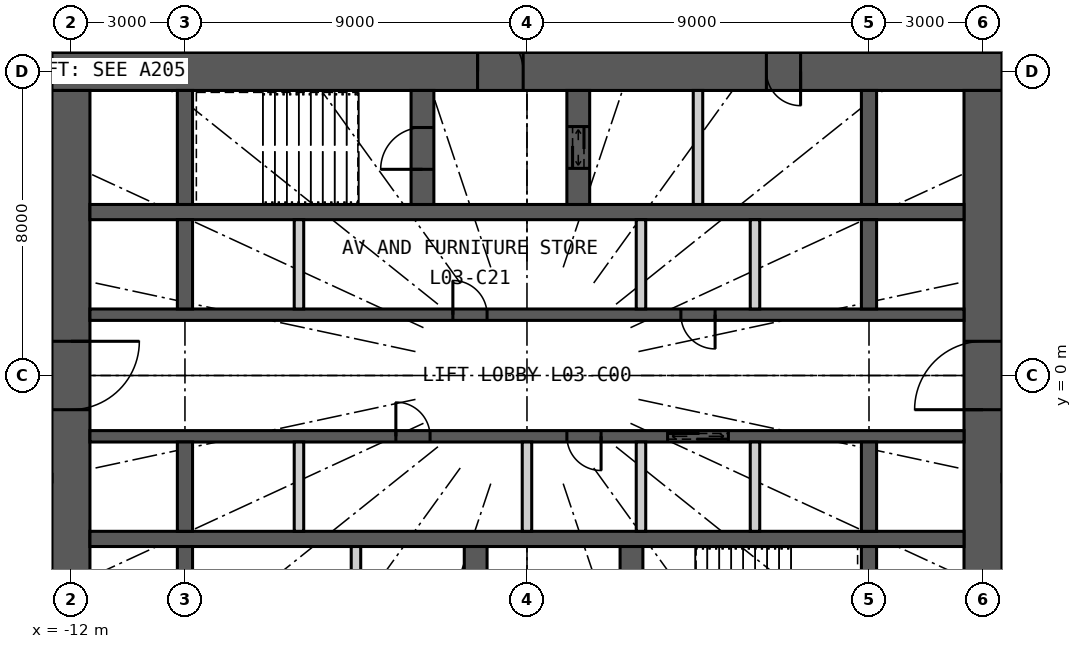
"""IFC4 building model, lengths in metres.
Left out: names, types, materials, properties, quantities, classifications, styles, units other than length and angle.
Written with IfcOpenShell. Run it as: python <this file> out.ifc"""

import sys

from ifc_helpers import new_model, si_unit, direction, frame, frame_2d, origin, place, context, subcontext, project, spatial, rectangle, extrude, element, fill, save


model = new_model("IFC4")
c1 = context("Model", 3, precision=1e-05, world=origin(), true_north=direction((0.0, 1.0)))
c2 = subcontext(c1, "Body", "Model", "MODEL_VIEW")
j1 = project(units=[si_unit("LENGTHUNIT", "METRE"), si_unit("PLANEANGLEUNIT", "RADIAN")], contexts=[c1])
p1 = place(None, origin())
s1 = spatial("IfcSite", under=j1, at=p1, CompositionType="ELEMENT")
p2 = place(p1, origin())
s2 = spatial("IfcBuilding", under=s1, at=p2, CompositionType="ELEMENT")
p3 = place(p2, frame((0.0, 0.0, 19.2)))
s3 = spatial("IfcBuildingStorey", under=s2, at=p3, CompositionType="ELEMENT", Elevation=19.2)
p4 = place(p3, frame((-12.5, 8.0, 0.0), z_axis=(0.0, 0.0, 1.0), x_axis=(1.0, 0.0, 0.0)))
e1 = element("IfcWall", 1, at=p4, inside=s3, PredefinedType="SHEAR", context=c2, shape_type="SweptSolid", body=[
    extrude(rectangle(XDim=25.0, YDim=1.0, at=frame_2d((12.5, 0.0))), origin(), (0.0, 0.0, 1.0), 5.4),
])
p5 = place(p4, frame((11.2, 0.0, 0.0)))
e2 = element("IfcOpeningElement", 2, at=p5, cuts=e1, PredefinedType="OPENING", context=c2, shape_type="SweptSolid", body=[
    extrude(rectangle(XDim=1.2, YDim=2.2, at=frame_2d((0.6, 1.1))), frame((0.0, 0.51, 0.0), z_axis=(0.0, -1.0, 0.0), x_axis=(1.0, 0.0, 0.0)), (0.0, 0.0, 1.0), 1.02),
])
p6 = place(p4, frame((18.8, 0.0, 0.0)))
e3 = element("IfcOpeningElement", 3, at=p6, cuts=e1, PredefinedType="OPENING", context=c2, shape_type="SweptSolid", body=[
    extrude(rectangle(XDim=0.9, YDim=2.2, at=frame_2d((0.45, 1.1))), frame((0.0, 0.51, 0.0), z_axis=(0.0, -1.0, 0.0), x_axis=(1.0, 0.0, 0.0)), (0.0, 0.0, 1.0), 1.02),
])
p7 = place(p3, frame((12.0, -7.5, 0.0), z_axis=(0.0, 0.0, 1.0), x_axis=(0.0, 1.0, 0.0)))
e4 = element("IfcWall", 4, at=p7, inside=s3, PredefinedType="SHEAR", context=c2, shape_type="SweptSolid", body=[
    extrude(rectangle(XDim=15.0, YDim=1.0, at=frame_2d((7.5, 0.0))), origin(), (0.0, 0.0, 1.0), 5.4),
])
p8 = place(p7, frame((6.6, 0.0, 0.0)))
e5 = element("IfcOpeningElement", 5, at=p8, cuts=e4, PredefinedType="OPENING", context=c2, shape_type="SweptSolid", body=[
    extrude(rectangle(XDim=1.8, YDim=2.2, at=frame_2d((0.9, 1.1))), frame((0.0, 0.51, 0.0), z_axis=(0.0, -1.0, 0.0), x_axis=(1.0, 0.0, 0.0)), (0.0, 0.0, 1.0), 1.02),
])
p9 = place(p3, frame((-12.0, 7.5, 0.0), z_axis=(0.0, 0.0, 1.0), x_axis=(0.0, -1.0, 0.0)))
e6 = element("IfcWall", 6, at=p9, inside=s3, PredefinedType="SHEAR", context=c2, shape_type="SweptSolid", body=[
    extrude(rectangle(XDim=15.0, YDim=1.0, at=frame_2d((7.5, 0.0))), origin(), (0.0, 0.0, 1.0), 5.4),
])
p10 = place(p9, frame((6.6, 0.0, 0.0)))
e7 = element("IfcOpeningElement", 7, at=p10, cuts=e6, PredefinedType="OPENING", context=c2, shape_type="SweptSolid", body=[
    extrude(rectangle(XDim=1.8, YDim=2.2, at=frame_2d((0.9, 1.1))), frame((0.0, 0.51, 0.0), z_axis=(0.0, -1.0, 0.0), x_axis=(1.0, 0.0, 0.0)), (0.0, 0.0, 1.0), 1.02),
])
p11 = place(p3, frame((-11.5, 4.3, 0.0), z_axis=(0.0, 0.0, 1.0), x_axis=(1.0, 0.0, 0.0)))
e8 = element("IfcWall", 8, at=p11, inside=s3, PredefinedType="SHEAR", context=c2, shape_type="SweptSolid", body=[
    extrude(rectangle(XDim=23.0, YDim=0.4, at=frame_2d((11.5, 0.0))), origin(), (0.0, 0.0, 1.0), 5.4),
])
p12 = place(p3, frame((-11.5, 1.6, 0.0), z_axis=(0.0, 0.0, 1.0), x_axis=(1.0, 0.0, 0.0)))
e9 = element("IfcWall", 9, at=p12, inside=s3, PredefinedType="SHEAR", context=c2, shape_type="SweptSolid", body=[
    extrude(rectangle(XDim=23.0, YDim=0.3, at=frame_2d((11.5, 0.0))), origin(), (0.0, 0.0, 1.0), 5.4),
])
p13 = place(p12, frame((9.55, 0.0, 0.0)))
e10 = element("IfcOpeningElement", 10, at=p13, cuts=e9, PredefinedType="OPENING", context=c2, shape_type="SweptSolid", body=[
    extrude(rectangle(XDim=0.9, YDim=2.2, at=frame_2d((0.45, 1.1))), frame((0.0, 0.16, 0.0), z_axis=(0.0, -1.0, 0.0), x_axis=(1.0, 0.0, 0.0)), (0.0, 0.0, 1.0), 0.32),
])
p14 = place(p12, frame((15.55, 0.0, 0.0)))
e11 = element("IfcOpeningElement", 11, at=p14, cuts=e9, PredefinedType="OPENING", context=c2, shape_type="SweptSolid", body=[
    extrude(rectangle(XDim=0.9, YDim=2.2, at=frame_2d((0.45, 1.1))), frame((0.0, 0.16, 0.0), z_axis=(0.0, -1.0, 0.0), x_axis=(1.0, 0.0, 0.0)), (0.0, 0.0, 1.0), 0.32),
])
p15 = place(p3, frame((-11.5, -4.3, 0.0), z_axis=(0.0, 0.0, 1.0), x_axis=(1.0, 0.0, 0.0)))
e12 = element("IfcWall", 12, at=p15, inside=s3, PredefinedType="SHEAR", context=c2, shape_type="SweptSolid", body=[
    extrude(rectangle(XDim=23.0, YDim=0.4, at=frame_2d((11.5, 0.0))), origin(), (0.0, 0.0, 1.0), 5.4),
])
p16 = place(p3, frame((-11.5, -1.6, 0.0), z_axis=(0.0, 0.0, 1.0), x_axis=(1.0, 0.0, 0.0)))
e13 = element("IfcWall", 13, at=p16, inside=s3, PredefinedType="SHEAR", context=c2, shape_type="SweptSolid", body=[
    extrude(rectangle(XDim=23.0, YDim=0.3, at=frame_2d((11.5, 0.0))), origin(), (0.0, 0.0, 1.0), 5.4),
])
p17 = place(p16, frame((15.2, 0.0, 0.0)))
e14 = element("IfcOpeningElement", 14, at=p17, cuts=e13, PredefinedType="OPENING", context=c2, shape_type="SweptSolid", body=[
    extrude(rectangle(XDim=1.6, YDim=2.4, at=frame_2d((0.8, 1.2))), frame((0.0, 0.16, 0.0), z_axis=(0.0, -1.0, 0.0), x_axis=(1.0, 0.0, 0.0)), (0.0, 0.0, 1.0), 0.32),
])
p18 = place(p16, frame((8.05, 0.0, 0.0)))
e15 = element("IfcOpeningElement", 15, at=p18, cuts=e13, PredefinedType="OPENING", context=c2, shape_type="SweptSolid", body=[
    extrude(rectangle(XDim=0.9, YDim=2.2, at=frame_2d((0.45, 1.1))), frame((0.0, 0.16, 0.0), z_axis=(0.0, -1.0, 0.0), x_axis=(1.0, 0.0, 0.0)), (0.0, 0.0, 1.0), 0.32),
])
p19 = place(p16, frame((12.55, 0.0, 0.0)))
e16 = element("IfcOpeningElement", 16, at=p19, cuts=e13, PredefinedType="OPENING", context=c2, shape_type="SweptSolid", body=[
    extrude(rectangle(XDim=0.9, YDim=2.2, at=frame_2d((0.45, 1.1))), frame((0.0, 0.16, 0.0), z_axis=(0.0, -1.0, 0.0), x_axis=(1.0, 0.0, 0.0)), (0.0, 0.0, 1.0), 0.32),
])
p20 = place(p3, frame((-9.0, 4.5, 0.0), z_axis=(0.0, 0.0, 1.0), x_axis=(0.0, 1.0, 0.0)))
e17 = element("IfcWall", 17, at=p20, inside=s3, PredefinedType="SHEAR", context=c2, shape_type="SweptSolid", body=[
    extrude(rectangle(XDim=3.0, YDim=0.4, at=frame_2d((1.5, 0.0))), origin(), (0.0, 0.0, 1.0), 5.4),
])
for number, where, z_axis, x_axis in (
    (18, (-9.0, 1.75, 0.0), (0.0, 0.0, 1.0), (0.0, 1.0, 0.0)),
    (19, (-9.0, -4.1, 0.0), (0.0, 0.0, 1.0), (0.0, 1.0, 0.0)),
):
    element("IfcWall", number, at=place(p3, frame(where, z_axis=z_axis, x_axis=x_axis)), inside=s3, PredefinedType="SHEAR", context=c2, shape_type="SweptSolid", body=[
        extrude(rectangle(XDim=2.35, YDim=0.4, at=frame_2d((1.175, 0.0))), origin(), (0.0, 0.0, 1.0), 5.4),
    ])
for number, where, z_axis, x_axis in (
    (20, (-9.0, -7.5, 0.0), (0.0, 0.0, 1.0), (0.0, 1.0, 0.0)),
    (21, (9.0, 4.5, 0.0), (0.0, 0.0, 1.0), (0.0, 1.0, 0.0)),
):
    element("IfcWall", number, at=place(p3, frame(where, z_axis=z_axis, x_axis=x_axis)), inside=s3, PredefinedType="SHEAR", context=c2, shape_type="SweptSolid", body=[
        extrude(rectangle(XDim=3.0, YDim=0.4, at=frame_2d((1.5, 0.0))), origin(), (0.0, 0.0, 1.0), 5.4),
    ])
for number, where, z_axis, x_axis in (
    (22, (9.0, 1.75, 0.0), (0.0, 0.0, 1.0), (0.0, 1.0, 0.0)),
    (23, (9.0, -4.1, 0.0), (0.0, 0.0, 1.0), (0.0, 1.0, 0.0)),
):
    element("IfcWall", number, at=place(p3, frame(where, z_axis=z_axis, x_axis=x_axis)), inside=s3, PredefinedType="SHEAR", context=c2, shape_type="SweptSolid", body=[
        extrude(rectangle(XDim=2.35, YDim=0.4, at=frame_2d((1.175, 0.0))), origin(), (0.0, 0.0, 1.0), 5.4),
    ])
p21 = place(p3, frame((9.0, -7.5, 0.0), z_axis=(0.0, 0.0, 1.0), x_axis=(0.0, 1.0, 0.0)))
e24 = element("IfcWall", 24, at=p21, inside=s3, PredefinedType="SHEAR", context=c2, shape_type="SweptSolid", body=[
    extrude(rectangle(XDim=3.0, YDim=0.4, at=frame_2d((1.5, 0.0))), origin(), (0.0, 0.0, 1.0), 5.4),
])
p22 = place(p3, frame((-2.75, 4.5, 0.0), z_axis=(0.0, 0.0, 1.0), x_axis=(0.0, 1.0, 0.0)))
e25 = element("IfcWall", 25, at=p22, inside=s3, PredefinedType="SHEAR", context=c2, shape_type="SweptSolid", body=[
    extrude(rectangle(XDim=3.0, YDim=0.6, at=frame_2d((1.5, 0.0))), origin(), (0.0, 0.0, 1.0), 5.4),
])
p23 = place(p22, frame((0.925, 0.0, 0.0)))
e26 = element("IfcOpeningElement", 26, at=p23, cuts=e25, PredefinedType="OPENING", context=c2, shape_type="SweptSolid", body=[
    extrude(rectangle(XDim=1.1, YDim=2.2, at=frame_2d((0.55, 1.1))), frame((0.0, 0.31, 0.0), z_axis=(0.0, -1.0, 0.0), x_axis=(1.0, 0.0, 0.0)), (0.0, 0.0, 1.0), 0.62),
])
p24 = place(p3, frame((1.35, 4.5, 0.0), z_axis=(0.0, 0.0, 1.0), x_axis=(0.0, 1.0, 0.0)))
e27 = element("IfcWall", 27, at=p24, inside=s3, PredefinedType="SHEAR", context=c2, shape_type="SweptSolid", body=[
    extrude(rectangle(XDim=3.0, YDim=0.6, at=frame_2d((1.5, 0.0))), origin(), (0.0, 0.0, 1.0), 5.4),
])
p25 = place(p24, frame((0.95, 0.0, 0.0)))
e28 = element("IfcOpeningElement", 28, at=p25, cuts=e27, PredefinedType="OPENING", context=c2, shape_type="SweptSolid", body=[
    extrude(rectangle(XDim=1.1, YDim=2.2, at=frame_2d((0.55, 1.1))), frame((0.0, 0.31, 0.0), z_axis=(0.0, -1.0, 0.0), x_axis=(1.0, 0.0, 0.0)), (0.0, 0.0, 1.0), 0.62),
])
p26 = place(p3, frame((4.5, 4.5, 0.0), z_axis=(0.0, 0.0, 1.0), x_axis=(0.0, 1.0, 0.0)))
e29 = element("IfcWall", 29, at=p26, inside=s3, PredefinedType="PARTITIONING", context=c2, shape_type="SweptSolid", body=[
    extrude(rectangle(XDim=3.0, YDim=0.25, at=frame_2d((1.5, 0.0))), origin(), (0.0, 0.0, 1.0), 5.4),
])
p27 = place(p3, frame((2.75, -7.5, 0.0), z_axis=(0.0, 0.0, 1.0), x_axis=(0.0, 1.0, 0.0)))
e30 = element("IfcWall", 30, at=p27, inside=s3, PredefinedType="SHEAR", context=c2, shape_type="SweptSolid", body=[
    extrude(rectangle(XDim=3.0, YDim=0.6, at=frame_2d((1.5, 0.0))), origin(), (0.0, 0.0, 1.0), 5.4),
])
p28 = place(p27, frame((0.975, 0.0, 0.0)))
e31 = element("IfcOpeningElement", 31, at=p28, cuts=e30, PredefinedType="OPENING", context=c2, shape_type="SweptSolid", body=[
    extrude(rectangle(XDim=1.1, YDim=2.2, at=frame_2d((0.55, 1.1))), frame((0.0, 0.31, 0.0), z_axis=(0.0, -1.0, 0.0), x_axis=(1.0, 0.0, 0.0)), (0.0, 0.0, 1.0), 0.62),
])
p29 = place(p3, frame((-1.35, -7.5, 0.0), z_axis=(0.0, 0.0, 1.0), x_axis=(0.0, 1.0, 0.0)))
e32 = element("IfcWall", 32, at=p29, inside=s3, PredefinedType="SHEAR", context=c2, shape_type="SweptSolid", body=[
    extrude(rectangle(XDim=3.0, YDim=0.6, at=frame_2d((1.5, 0.0))), origin(), (0.0, 0.0, 1.0), 5.4),
])
p30 = place(p29, frame((0.95, 0.0, 0.0)))
e33 = element("IfcOpeningElement", 33, at=p30, cuts=e32, PredefinedType="OPENING", context=c2, shape_type="SweptSolid", body=[
    extrude(rectangle(XDim=1.1, YDim=2.2, at=frame_2d((0.55, 1.1))), frame((0.0, 0.31, 0.0), z_axis=(0.0, -1.0, 0.0), x_axis=(1.0, 0.0, 0.0)), (0.0, 0.0, 1.0), 0.62),
])
p31 = place(p3, frame((-4.5, -7.5, 0.0), z_axis=(0.0, 0.0, 1.0), x_axis=(0.0, 1.0, 0.0)))
e34 = element("IfcWall", 34, at=p31, inside=s3, PredefinedType="PARTITIONING", context=c2, shape_type="SweptSolid", body=[
    extrude(rectangle(XDim=3.0, YDim=0.25, at=frame_2d((1.5, 0.0))), origin(), (0.0, 0.0, 1.0), 5.4),
])
for number, where, z_axis, x_axis in (
    (35, (-6.0, 1.75, 0.0), (0.0, 0.0, 1.0), (0.0, 1.0, 0.0)),
    (36, (3.0, 1.75, 0.0), (0.0, 0.0, 1.0), (0.0, 1.0, 0.0)),
    (37, (6.0, 1.75, 0.0), (0.0, 0.0, 1.0), (0.0, 1.0, 0.0)),
    (38, (-6.0, -4.1, 0.0), (0.0, 0.0, 1.0), (0.0, 1.0, 0.0)),
    (39, (0.0, -4.1, 0.0), (0.0, 0.0, 1.0), (0.0, 1.0, 0.0)),
    (40, (3.0, -4.1, 0.0), (0.0, 0.0, 1.0), (0.0, 1.0, 0.0)),
    (41, (6.0, -4.1, 0.0), (0.0, 0.0, 1.0), (0.0, 1.0, 0.0)),
):
    element("IfcWall", number, at=place(p3, frame(where, z_axis=z_axis, x_axis=x_axis)), inside=s3, PredefinedType="PARTITIONING", context=c2, shape_type="SweptSolid", body=[
        extrude(rectangle(XDim=2.35, YDim=0.25, at=frame_2d((1.175, 0.0))), origin(), (0.0, 0.0, 1.0), 5.4),
    ])
p32 = place(p5, origin())
e42 = element("IfcDoor", 42, at=p32, inside=s3, OperationType="SINGLE_SWING_LEFT", PredefinedType="DOOR", context=c2, shape_type="SweptSolid", body=[
    extrude(rectangle(XDim=1.2, YDim=2.2, at=frame_2d((0.6, 1.1))), frame((0.0, 0.025, 0.0), z_axis=(0.0, -1.0, 0.0), x_axis=(1.0, 0.0, 0.0)), (0.0, 0.0, 1.0), 0.05),
])
fill(e2, e42)
p33 = place(p23, origin())
e43 = element("IfcDoor", 43, at=p33, inside=s3, OperationType="SINGLE_SWING_LEFT", PredefinedType="DOOR", context=c2, shape_type="SweptSolid", body=[
    extrude(rectangle(XDim=1.1, YDim=2.2, at=frame_2d((0.55, 1.1))), frame((0.0, 0.025, 0.0), z_axis=(0.0, -1.0, 0.0), x_axis=(1.0, 0.0, 0.0)), (0.0, 0.0, 1.0), 0.05),
])
fill(e26, e43)
p34 = place(p25, origin())
e44 = element("IfcDoor", 44, at=p34, inside=s3, OperationType="DOUBLE_DOOR_SLIDING", PredefinedType="DOOR", context=c2, shape_type="SweptSolid", body=[
    extrude(rectangle(XDim=1.1, YDim=2.2, at=frame_2d((0.55, 1.1))), frame((0.0, 0.025, 0.0), z_axis=(0.0, -1.0, 0.0), x_axis=(1.0, 0.0, 0.0)), (0.0, 0.0, 1.0), 0.05),
])
fill(e28, e44)
p35 = place(p6, origin())
e45 = element("IfcDoor", 45, at=p35, inside=s3, OperationType="SINGLE_SWING_RIGHT", PredefinedType="DOOR", context=c2, shape_type="SweptSolid", body=[
    extrude(rectangle(XDim=0.9, YDim=2.2, at=frame_2d((0.45, 1.1))), frame((0.0, 0.025, 0.0), z_axis=(0.0, -1.0, 0.0), x_axis=(1.0, 0.0, 0.0)), (0.0, 0.0, 1.0), 0.05),
])
fill(e3, e45)
p36 = place(p17, origin())
e46 = element("IfcDoor", 46, at=p36, inside=s3, OperationType="DOUBLE_DOOR_SLIDING", PredefinedType="DOOR", context=c2, shape_type="SweptSolid", body=[
    extrude(rectangle(XDim=1.6, YDim=2.4, at=frame_2d((0.8, 1.2))), frame((0.0, 0.025, 0.0), z_axis=(0.0, -1.0, 0.0), x_axis=(1.0, 0.0, 0.0)), (0.0, 0.0, 1.0), 0.05),
])
fill(e14, e46)
p37 = place(p13, origin())
e47 = element("IfcDoor", 47, at=p37, inside=s3, OperationType="SINGLE_SWING_LEFT", PredefinedType="DOOR", context=c2, shape_type="SweptSolid", body=[
    extrude(rectangle(XDim=0.9, YDim=2.2, at=frame_2d((0.45, 1.1))), frame((0.0, 0.025, 0.0), z_axis=(0.0, -1.0, 0.0), x_axis=(1.0, 0.0, 0.0)), (0.0, 0.0, 1.0), 0.05),
])
fill(e10, e47)
p38 = place(p14, origin())
e48 = element("IfcDoor", 48, at=p38, inside=s3, OperationType="SINGLE_SWING_RIGHT", PredefinedType="DOOR", context=c2, shape_type="SweptSolid", body=[
    extrude(rectangle(XDim=0.9, YDim=2.2, at=frame_2d((0.45, 1.1))), frame((0.0, 0.025, 0.0), z_axis=(0.0, -1.0, 0.0), x_axis=(1.0, 0.0, 0.0)), (0.0, 0.0, 1.0), 0.05),
])
fill(e11, e48)
p39 = place(p18, origin())
e49 = element("IfcDoor", 49, at=p39, inside=s3, OperationType="SINGLE_SWING_LEFT", PredefinedType="DOOR", context=c2, shape_type="SweptSolid", body=[
    extrude(rectangle(XDim=0.9, YDim=2.2, at=frame_2d((0.45, 1.1))), frame((0.0, 0.025, 0.0), z_axis=(0.0, -1.0, 0.0), x_axis=(1.0, 0.0, 0.0)), (0.0, 0.0, 1.0), 0.05),
])
fill(e15, e49)
p40 = place(p19, origin())
e50 = element("IfcDoor", 50, at=p40, inside=s3, OperationType="SINGLE_SWING_RIGHT", PredefinedType="DOOR", context=c2, shape_type="SweptSolid", body=[
    extrude(rectangle(XDim=0.9, YDim=2.2, at=frame_2d((0.45, 1.1))), frame((0.0, 0.025, 0.0), z_axis=(0.0, -1.0, 0.0), x_axis=(1.0, 0.0, 0.0)), (0.0, 0.0, 1.0), 0.05),
])
fill(e16, e50)
p41 = place(p8, origin())
e51 = element("IfcDoor", 51, at=p41, inside=s3, OperationType="DOUBLE_DOOR_DOUBLE_SWING", PredefinedType="DOOR", context=c2, shape_type="SweptSolid", body=[
    extrude(rectangle(XDim=1.8, YDim=2.2, at=frame_2d((0.9, 1.1))), frame((0.0, 0.025, 0.0), z_axis=(0.0, -1.0, 0.0), x_axis=(1.0, 0.0, 0.0)), (0.0, 0.0, 1.0), 0.05),
])
fill(e5, e51)
p42 = place(p10, origin())
e52 = element("IfcDoor", 52, at=p42, inside=s3, OperationType="DOUBLE_DOOR_DOUBLE_SWING", PredefinedType="DOOR", context=c2, shape_type="SweptSolid", body=[
    extrude(rectangle(XDim=1.8, YDim=2.2, at=frame_2d((0.9, 1.1))), frame((0.0, 0.025, 0.0), z_axis=(0.0, -1.0, 0.0), x_axis=(1.0, 0.0, 0.0)), (0.0, 0.0, 1.0), 0.05),
])
fill(e7, e52)
save(model, sys.argv[1])
